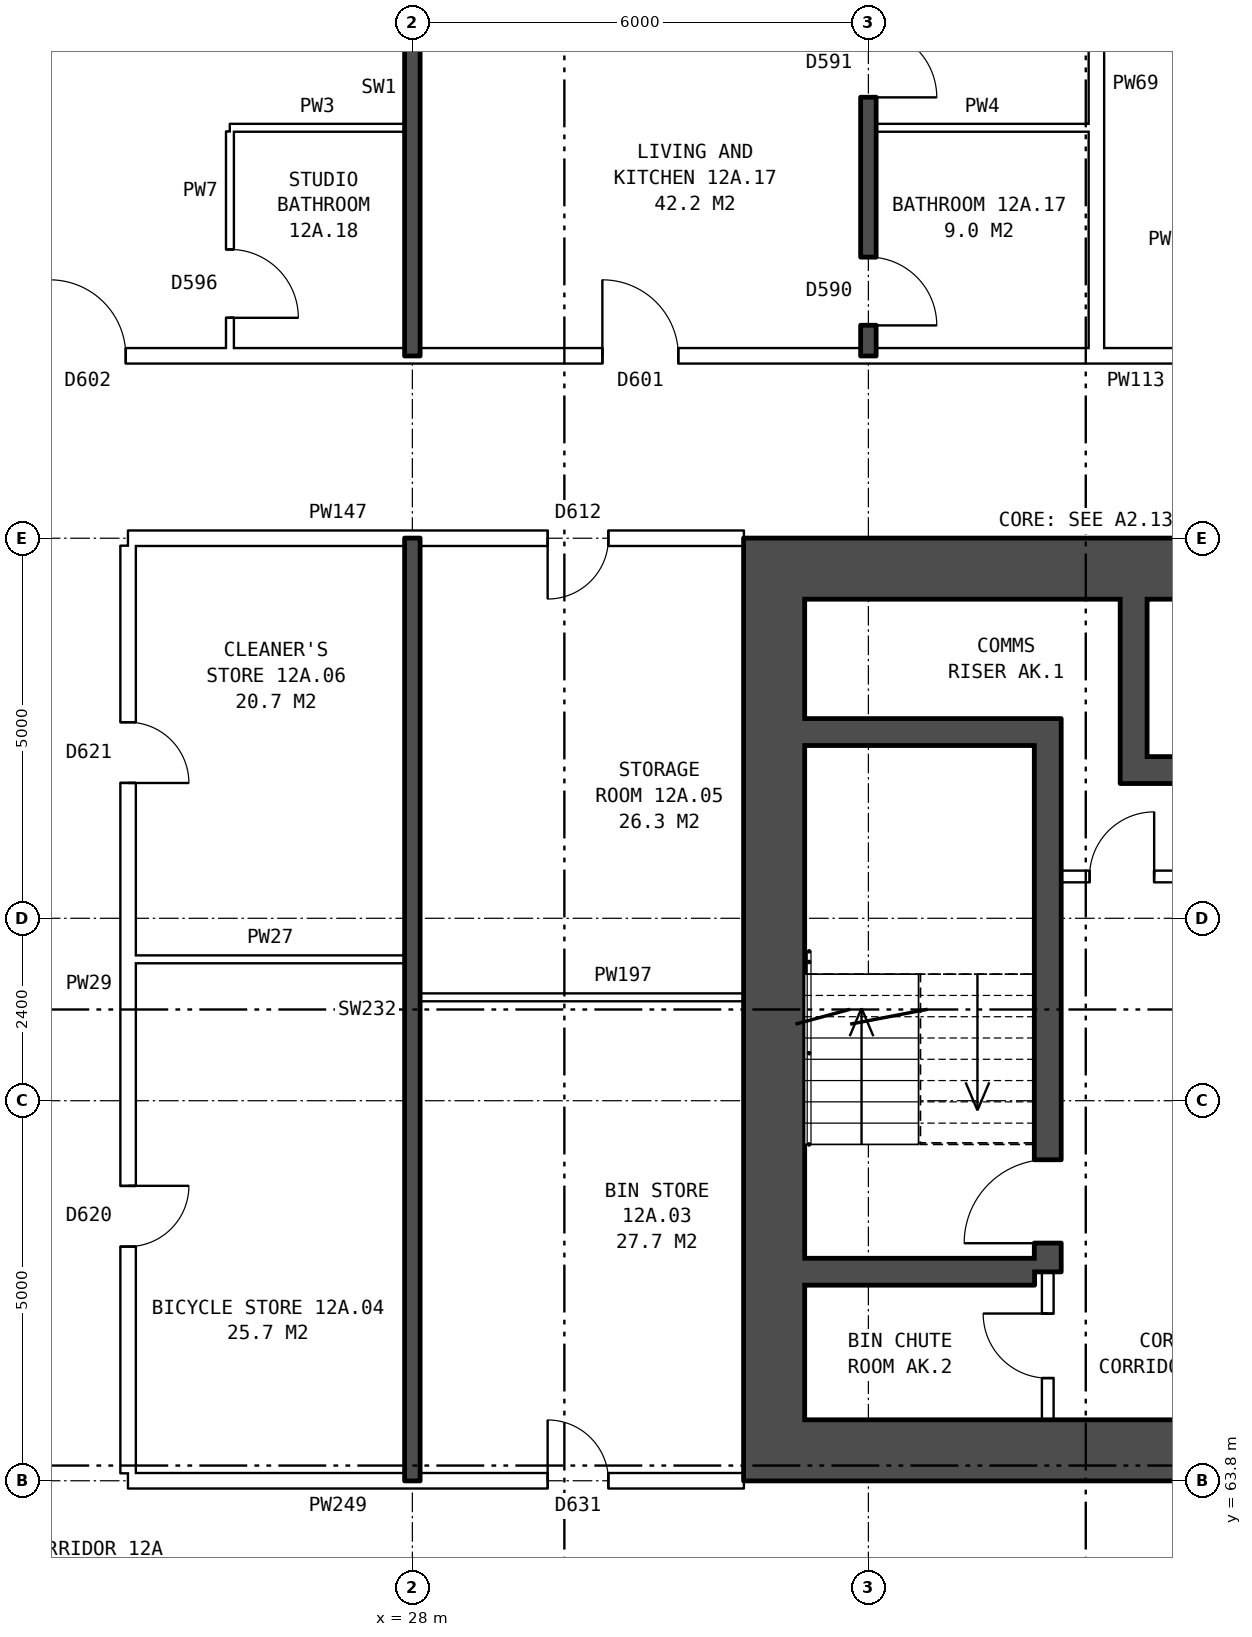
"""IFC4 building model, lengths in metres.
Left out: names, types, materials, properties, quantities, classifications, styles, units other than length and angle.
Written with IfcOpenShell. Run it as: python <this file> out.ifc"""

import sys

from ifc_helpers import new_model, si_unit, direction, frame, frame_2d, origin, place, context, subcontext, project, spatial, rectangle, extrude, element, fill, save


model = new_model("IFC4")
c1 = context("Model", 3, precision=1e-05, world=origin(), true_north=direction((0.0, 1.0)))
c2 = subcontext(c1, "Body", "Model", "MODEL_VIEW")
j1 = project(units=[si_unit("LENGTHUNIT", "METRE"), si_unit("PLANEANGLEUNIT", "RADIAN")], contexts=[c1])
p1 = place(None, origin())
s1 = spatial("IfcSite", under=j1, at=p1, CompositionType="ELEMENT")
p2 = place(p1, origin())
s2 = spatial("IfcBuilding", under=s1, at=p2, CompositionType="ELEMENT")
p3 = place(p2, frame((0.0, 0.0, 47.4)))
s3 = spatial("IfcBuildingStorey", under=s2, at=p3, CompositionType="ELEMENT", Elevation=47.4)
p4 = place(p3, frame((32.76, 75.4, 0.0), z_axis=(0.0, 0.0, 1.0), x_axis=(0.0, -1.0, 0.0)))
e1 = element("IfcWall", 1, at=p4, inside=s3, PredefinedType="SHEAR", context=c2, shape_type="SweptSolid", body=[
    extrude(rectangle(XDim=10.8, YDim=0.8, at=frame_2d((5.4, 0.0))), origin(), (0.0, 0.0, 1.0), 2.85),
])
for number, where, z_axis, x_axis in (
    (2, (41.36, 75.8, 0.0), (0.0, 0.0, 1.0), (-1.0, 0.0, 0.0)),
    (3, (41.36, 64.2, 0.0), (0.0, 0.0, 1.0), (-1.0, 0.0, 0.0)),
):
    element("IfcWall", number, at=place(p3, frame(where, z_axis=z_axis, x_axis=x_axis)), inside=s3, PredefinedType="SHEAR", context=c2, shape_type="SweptSolid", body=[
        extrude(rectangle(XDim=9.0, YDim=0.8, at=frame_2d((4.5, 0.0))), origin(), (0.0, 0.0, 1.0), 2.85),
    ])
p5 = place(p3, frame((36.185, 73.65, 0.0), z_axis=(0.0, 0.0, 1.0), x_axis=(-1.0, 0.0, 0.0)))
e4 = element("IfcWall", 4, at=p5, inside=s3, PredefinedType="SHEAR", context=c2, shape_type="SweptSolid", body=[
    extrude(rectangle(XDim=3.025, YDim=0.35, at=frame_2d((1.513, 0.0))), origin(), (0.0, 0.0, 1.0), 2.85),
])
p6 = place(p3, frame((40.56, 73.15, 0.0), z_axis=(0.0, 0.0, 1.0), x_axis=(-1.0, 0.0, 0.0)))
e5 = element("IfcWall", 5, at=p6, inside=s3, PredefinedType="SHEAR", context=c2, shape_type="SweptSolid", body=[
    extrude(rectangle(XDim=3.245, YDim=0.35, at=frame_2d((1.623, 0.0))), origin(), (0.0, 0.0, 1.0), 2.85),
])
p7 = place(p3, frame((38.135, 71.75, 0.0), z_axis=(0.0, 0.0, 1.0), x_axis=(-1.0, 0.0, 0.0)))
e6 = element("IfcWall", 6, at=p7, inside=s3, PredefinedType="PARTITIONING", context=c2, shape_type="SweptSolid", body=[
    extrude(rectangle(XDim=1.6, YDim=0.15, at=frame_2d((0.8, 0.0))), origin(), (0.0, 0.0, 1.0), 2.85),
])
p8 = place(p7, frame((0.375, 0.0, 0.0)))
e7 = element("IfcOpeningElement", 7, at=p8, cuts=e6, PredefinedType="OPENING", context=c2, shape_type="SweptSolid", body=[
    extrude(rectangle(XDim=0.85, YDim=2.1, at=frame_2d((0.425, 1.05))), frame((0.0, 0.085, 0.0), z_axis=(0.0, -1.0, 0.0), x_axis=(1.0, 0.0, 0.0)), (0.0, 0.0, 1.0), 0.17),
])
p9 = place(p3, frame((36.185, 66.55, 0.0), z_axis=(0.0, 0.0, 1.0), x_axis=(-1.0, 0.0, 0.0)))
e8 = element("IfcWall", 8, at=p9, inside=s3, PredefinedType="SHEAR", context=c2, shape_type="SweptSolid", body=[
    extrude(rectangle(XDim=3.025, YDim=0.35, at=frame_2d((1.513, 0.0))), origin(), (0.0, 0.0, 1.0), 2.85),
])
p10 = place(p3, frame((37.49, 75.4, 0.0), z_axis=(0.0, 0.0, 1.0), x_axis=(0.0, -1.0, 0.0)))
e9 = element("IfcWall", 9, at=p10, inside=s3, PredefinedType="SHEAR", context=c2, shape_type="SweptSolid", body=[
    extrude(rectangle(XDim=2.075, YDim=0.35, at=frame_2d((1.038, 0.0))), origin(), (0.0, 0.0, 1.0), 2.85),
])
p11 = place(p3, frame((36.36, 73.825, 0.0), z_axis=(0.0, 0.0, 1.0), x_axis=(0.0, -1.0, 0.0)))
e10 = element("IfcWall", 10, at=p11, inside=s3, PredefinedType="SHEAR", context=c2, shape_type="SweptSolid", body=[
    extrude(rectangle(XDim=7.275, YDim=0.35, at=frame_2d((3.637, 0.0))), origin(), (0.0, 0.0, 1.0), 2.85),
])
p12 = place(p11, frame((5.8, 0.0, 0.0)))
e11 = element("IfcOpeningElement", 11, at=p12, cuts=e10, PredefinedType="OPENING", context=c2, shape_type="SweptSolid", body=[
    extrude(rectangle(XDim=1.1, YDim=2.1, at=frame_2d((0.55, 1.05))), frame((0.0, 0.185, 0.0), z_axis=(0.0, -1.0, 0.0), x_axis=(1.0, 0.0, 0.0)), (0.0, 0.0, 1.0), 0.37),
])
p13 = place(p3, frame((36.36, 66.55, 0.0), z_axis=(0.0, 0.0, 1.0), x_axis=(0.0, -1.0, 0.0)))
e12 = element("IfcWall", 12, at=p13, inside=s3, PredefinedType="PARTITIONING", context=c2, shape_type="SweptSolid", body=[
    extrude(rectangle(XDim=1.95, YDim=0.15, at=frame_2d((0.975, 0.0))), origin(), (0.0, 0.0, 1.0), 2.85),
])
p14 = place(p13, frame((0.55, 0.0, 0.0)))
e13 = element("IfcOpeningElement", 13, at=p14, cuts=e12, PredefinedType="OPENING", context=c2, shape_type="SweptSolid", body=[
    extrude(rectangle(XDim=0.85, YDim=2.1, at=frame_2d((0.425, 1.05))), frame((0.0, 0.085, 0.0), z_axis=(0.0, -1.0, 0.0), x_axis=(1.0, 0.0, 0.0)), (0.0, 0.0, 1.0), 0.17),
])
p15 = place(p3, frame((24.26, 63.8, 0.0), z_axis=(0.0, 0.0, 1.0), x_axis=(1.0, 0.0, 0.0)))
e14 = element("IfcWall", 14, at=p15, inside=s3, PredefinedType="PARTITIONING", context=c2, shape_type="SweptSolid", body=[
    extrude(rectangle(XDim=8.1, YDim=0.2, at=frame_2d((4.05, 0.0))), origin(), (0.0, 0.0, 1.0), 2.85),
])
p16 = place(p15, frame((5.52, 0.0, 0.0)))
e15 = element("IfcOpeningElement", 15, at=p16, cuts=e14, PredefinedType="OPENING", context=c2, shape_type="SweptSolid", body=[
    extrude(rectangle(XDim=0.8, YDim=2.1, at=frame_2d((0.4, 1.05))), frame((0.0, 0.11, 0.0), z_axis=(0.0, -1.0, 0.0), x_axis=(1.0, 0.0, 0.0)), (0.0, 0.0, 1.0), 0.22),
])
p17 = place(p3, frame((28.1, 70.16, 0.0), z_axis=(0.0, 0.0, 1.0), x_axis=(1.0, 0.0, 0.0)))
e16 = element("IfcWall", 16, at=p17, inside=s3, PredefinedType="PARTITIONING", context=c2, shape_type="SweptSolid", body=[
    extrude(rectangle(XDim=4.26, YDim=0.1, at=frame_2d((2.13, 0.0))), origin(), (0.0, 0.0, 1.0), 2.85),
])
p18 = place(p3, frame((24.36, 70.66, 0.0), z_axis=(0.0, 0.0, 1.0), x_axis=(1.0, 0.0, 0.0)))
e17 = element("IfcWall", 17, at=p18, inside=s3, PredefinedType="PARTITIONING", context=c2, shape_type="SweptSolid", body=[
    extrude(rectangle(XDim=3.54, YDim=0.1, at=frame_2d((1.77, 0.0))), origin(), (0.0, 0.0, 1.0), 2.85),
])
p19 = place(p3, frame((24.26, 76.2, 0.0), z_axis=(0.0, 0.0, 1.0), x_axis=(1.0, 0.0, 0.0)))
e18 = element("IfcWall", 18, at=p19, inside=s3, PredefinedType="PARTITIONING", context=c2, shape_type="SweptSolid", body=[
    extrude(rectangle(XDim=8.1, YDim=0.2, at=frame_2d((4.05, 0.0))), origin(), (0.0, 0.0, 1.0), 2.85),
])
p20 = place(p19, frame((5.52, 0.0, 0.0)))
e19 = element("IfcOpeningElement", 19, at=p20, cuts=e18, PredefinedType="OPENING", context=c2, shape_type="SweptSolid", body=[
    extrude(rectangle(XDim=0.8, YDim=2.1, at=frame_2d((0.4, 1.05))), frame((0.0, 0.11, 0.0), z_axis=(0.0, -1.0, 0.0), x_axis=(1.0, 0.0, 0.0)), (0.0, 0.0, 1.0), 0.22),
])
p21 = place(p3, frame((21.86, 78.6, 0.0), z_axis=(0.0, 0.0, 1.0), x_axis=(1.0, 0.0, 0.0)))
e20 = element("IfcWall", 20, at=p21, inside=s3, PredefinedType="PARTITIONING", context=c2, shape_type="SweptSolid", body=[
    extrude(rectangle(XDim=24.04, YDim=0.2, at=frame_2d((12.02, 0.0))), origin(), (0.0, 0.0, 1.0), 2.85),
])
p22 = place(p21, frame((20.59, 0.0, 0.0)))
e21 = element("IfcOpeningElement", 21, at=p22, cuts=e20, PredefinedType="OPENING", context=c2, shape_type="SweptSolid", body=[
    extrude(rectangle(XDim=1.0, YDim=2.1, at=frame_2d((0.5, 1.05))), frame((0.0, 0.11, 0.0), z_axis=(0.0, -1.0, 0.0), x_axis=(1.0, 0.0, 0.0)), (0.0, 0.0, 1.0), 0.22),
])
p23 = place(p21, frame((8.64, 0.0, 0.0)))
e22 = element("IfcOpeningElement", 22, at=p23, cuts=e20, PredefinedType="OPENING", context=c2, shape_type="SweptSolid", body=[
    extrude(rectangle(XDim=1.0, YDim=2.1, at=frame_2d((0.5, 1.05))), frame((0.0, 0.11, 0.0), z_axis=(0.0, -1.0, 0.0), x_axis=(1.0, 0.0, 0.0)), (0.0, 0.0, 1.0), 0.22),
])
p24 = place(p21, frame((1.37, 0.0, 0.0)))
e23 = element("IfcOpeningElement", 23, at=p24, cuts=e20, PredefinedType="OPENING", context=c2, shape_type="SweptSolid", body=[
    extrude(rectangle(XDim=1.0, YDim=2.1, at=frame_2d((0.5, 1.05))), frame((0.0, 0.11, 0.0), z_axis=(0.0, -1.0, 0.0), x_axis=(1.0, 0.0, 0.0)), (0.0, 0.0, 1.0), 0.22),
])
p25 = place(p3, frame((25.6, 81.6, 0.0), z_axis=(0.0, 0.0, 1.0), x_axis=(1.0, 0.0, 0.0)))
e24 = element("IfcWall", 24, at=p25, inside=s3, PredefinedType="PARTITIONING", context=c2, shape_type="SweptSolid", body=[
    extrude(rectangle(XDim=2.3, YDim=0.1, at=frame_2d((1.15, 0.0))), origin(), (0.0, 0.0, 1.0), 2.85),
])
p26 = place(p3, frame((34.1, 81.6, 0.0), z_axis=(0.0, 0.0, 1.0), x_axis=(1.0, 0.0, 0.0)))
e25 = element("IfcWall", 25, at=p26, inside=s3, PredefinedType="PARTITIONING", context=c2, shape_type="SweptSolid", body=[
    extrude(rectangle(XDim=2.8, YDim=0.1, at=frame_2d((1.4, 0.0))), origin(), (0.0, 0.0, 1.0), 2.85),
])
p27 = place(p3, frame((24.26, 63.9, 0.0), z_axis=(0.0, 0.0, 1.0), x_axis=(0.0, 1.0, 0.0)))
e26 = element("IfcWall", 26, at=p27, inside=s3, PredefinedType="PARTITIONING", context=c2, shape_type="SweptSolid", body=[
    extrude(rectangle(XDim=12.2, YDim=0.2, at=frame_2d((6.1, 0.0))), origin(), (0.0, 0.0, 1.0), 2.85),
])
p28 = place(p27, frame((2.98, 0.0, 0.0)))
e27 = element("IfcOpeningElement", 27, at=p28, cuts=e26, PredefinedType="OPENING", context=c2, shape_type="SweptSolid", body=[
    extrude(rectangle(XDim=0.8, YDim=2.1, at=frame_2d((0.4, 1.05))), frame((0.0, 0.11, 0.0), z_axis=(0.0, -1.0, 0.0), x_axis=(1.0, 0.0, 0.0)), (0.0, 0.0, 1.0), 0.22),
])
p29 = place(p27, frame((9.08, 0.0, 0.0)))
e28 = element("IfcOpeningElement", 28, at=p29, cuts=e26, PredefinedType="OPENING", context=c2, shape_type="SweptSolid", body=[
    extrude(rectangle(XDim=0.8, YDim=2.1, at=frame_2d((0.4, 1.05))), frame((0.0, 0.11, 0.0), z_axis=(0.0, -1.0, 0.0), x_axis=(1.0, 0.0, 0.0)), (0.0, 0.0, 1.0), 0.22),
])
p30 = place(p3, frame((25.6, 78.7, 0.0), z_axis=(0.0, 0.0, 1.0), x_axis=(0.0, 1.0, 0.0)))
e29 = element("IfcWall", 29, at=p30, inside=s3, PredefinedType="PARTITIONING", context=c2, shape_type="SweptSolid", body=[
    extrude(rectangle(XDim=2.85, YDim=0.1, at=frame_2d((1.425, 0.0))), origin(), (0.0, 0.0, 1.0), 2.85),
])
p31 = place(p30, frame((0.4, 0.0, 0.0)))
e30 = element("IfcOpeningElement", 30, at=p31, cuts=e29, PredefinedType="OPENING", context=c2, shape_type="SweptSolid", body=[
    extrude(rectangle(XDim=0.9, YDim=2.1, at=frame_2d((0.45, 1.05))), frame((0.0, 0.06, 0.0), z_axis=(0.0, -1.0, 0.0), x_axis=(1.0, 0.0, 0.0)), (0.0, 0.0, 1.0), 0.12),
])
p32 = place(p3, frame((28.0, 63.8, 0.0), z_axis=(0.0, 0.0, 1.0), x_axis=(0.0, 1.0, 0.0)))
e31 = element("IfcWall", 31, at=p32, inside=s3, PredefinedType="SOLIDWALL", context=c2, shape_type="SweptSolid", body=[
    extrude(rectangle(XDim=12.4, YDim=0.2, at=frame_2d((6.2, 0.0))), origin(), (0.0, 0.0, 1.0), 2.85),
])
p33 = place(p3, frame((28.0, 78.6, 0.0), z_axis=(0.0, 0.0, 1.0), x_axis=(0.0, 1.0, 0.0)))
e32 = element("IfcWall", 32, at=p33, inside=s3, PredefinedType="SOLIDWALL", context=c2, shape_type="SweptSolid", body=[
    extrude(rectangle(XDim=7.04, YDim=0.2, at=frame_2d((3.52, 0.0))), origin(), (0.0, 0.0, 1.0), 2.85),
])
p34 = place(p3, frame((34.0, 78.6, 0.0), z_axis=(0.0, 0.0, 1.0), x_axis=(0.0, 1.0, 0.0)))
e33 = element("IfcWall", 33, at=p34, inside=s3, PredefinedType="SOLIDWALL", context=c2, shape_type="SweptSolid", body=[
    extrude(rectangle(XDim=7.04, YDim=0.2, at=frame_2d((3.52, 0.0))), origin(), (0.0, 0.0, 1.0), 2.85),
])
p35 = place(p34, frame((3.4, 0.0, 0.0)))
e34 = element("IfcOpeningElement", 34, at=p35, cuts=e33, PredefinedType="OPENING", context=c2, shape_type="SweptSolid", body=[
    extrude(rectangle(XDim=0.9, YDim=2.1, at=frame_2d((0.45, 1.05))), frame((0.0, 0.11, 0.0), z_axis=(0.0, -1.0, 0.0), x_axis=(1.0, 0.0, 0.0)), (0.0, 0.0, 1.0), 0.22),
])
p36 = place(p34, frame((0.4, 0.0, 0.0)))
e35 = element("IfcOpeningElement", 35, at=p36, cuts=e33, PredefinedType="OPENING", context=c2, shape_type="SweptSolid", body=[
    extrude(rectangle(XDim=0.9, YDim=2.1, at=frame_2d((0.45, 1.05))), frame((0.0, 0.11, 0.0), z_axis=(0.0, -1.0, 0.0), x_axis=(1.0, 0.0, 0.0)), (0.0, 0.0, 1.0), 0.22),
])
p37 = place(p3, frame((37.0, 78.7, 0.0), z_axis=(0.0, 0.0, 1.0), x_axis=(0.0, 1.0, 0.0)))
e36 = element("IfcWall", 36, at=p37, inside=s3, PredefinedType="PARTITIONING", context=c2, shape_type="SweptSolid", body=[
    extrude(rectangle(XDim=6.94, YDim=0.2, at=frame_2d((3.47, 0.0))), origin(), (0.0, 0.0, 1.0), 2.85),
])
p38 = place(p12, frame((1.1, 0.0, 0.0), z_axis=(0.0, 0.0, 1.0), x_axis=(-1.0, 0.0, 0.0)))
e37 = element("IfcDoor", 37, at=p38, inside=s3, OperationType="SINGLE_SWING_LEFT", PredefinedType="DOOR", context=c2, shape_type="SweptSolid", body=[
    extrude(rectangle(XDim=1.1, YDim=2.1, at=frame_2d((0.55, 1.05))), frame((0.0, 0.025, 0.0), z_axis=(0.0, -1.0, 0.0), x_axis=(1.0, 0.0, 0.0)), (0.0, 0.0, 1.0), 0.05),
])
fill(e11, e37)
p39 = place(p8, frame((0.85, 0.0, 0.0), z_axis=(0.0, 0.0, 1.0), x_axis=(-1.0, 0.0, 0.0)))
e38 = element("IfcDoor", 38, at=p39, inside=s3, OperationType="SINGLE_SWING_RIGHT", PredefinedType="DOOR", context=c2, shape_type="SweptSolid", body=[
    extrude(rectangle(XDim=0.85, YDim=2.1, at=frame_2d((0.425, 1.05))), frame((0.0, 0.025, 0.0), z_axis=(0.0, -1.0, 0.0), x_axis=(1.0, 0.0, 0.0)), (0.0, 0.0, 1.0), 0.05),
])
fill(e7, e38)
p40 = place(p14, frame((0.85, 0.0, 0.0), z_axis=(0.0, 0.0, 1.0), x_axis=(-1.0, 0.0, 0.0)))
e39 = element("IfcDoor", 39, at=p40, inside=s3, OperationType="SINGLE_SWING_RIGHT", PredefinedType="DOOR", context=c2, shape_type="SweptSolid", body=[
    extrude(rectangle(XDim=0.85, YDim=2.1, at=frame_2d((0.425, 1.05))), frame((0.0, 0.025, 0.0), z_axis=(0.0, -1.0, 0.0), x_axis=(1.0, 0.0, 0.0)), (0.0, 0.0, 1.0), 0.05),
])
fill(e13, e39)
p41 = place(p16, origin())
e40 = element("IfcDoor", 40, at=p41, inside=s3, OperationType="SINGLE_SWING_LEFT", PredefinedType="DOOR", context=c2, shape_type="SweptSolid", body=[
    extrude(rectangle(XDim=0.8, YDim=2.1, at=frame_2d((0.4, 1.05))), frame((0.0, 0.025, 0.0), z_axis=(0.0, -1.0, 0.0), x_axis=(1.0, 0.0, 0.0)), (0.0, 0.0, 1.0), 0.05),
])
fill(e15, e40)
p42 = place(p28, frame((0.8, 0.0, 0.0), z_axis=(0.0, 0.0, 1.0), x_axis=(-1.0, 0.0, 0.0)))
e41 = element("IfcDoor", 41, at=p42, inside=s3, OperationType="SINGLE_SWING_LEFT", PredefinedType="DOOR", context=c2, shape_type="SweptSolid", body=[
    extrude(rectangle(XDim=0.8, YDim=2.1, at=frame_2d((0.4, 1.05))), frame((0.0, 0.025, 0.0), z_axis=(0.0, -1.0, 0.0), x_axis=(1.0, 0.0, 0.0)), (0.0, 0.0, 1.0), 0.05),
])
fill(e27, e41)
p43 = place(p20, frame((0.8, 0.0, 0.0), z_axis=(0.0, 0.0, 1.0), x_axis=(-1.0, 0.0, 0.0)))
e42 = element("IfcDoor", 42, at=p43, inside=s3, OperationType="SINGLE_SWING_RIGHT", PredefinedType="DOOR", context=c2, shape_type="SweptSolid", body=[
    extrude(rectangle(XDim=0.8, YDim=2.1, at=frame_2d((0.4, 1.05))), frame((0.0, 0.025, 0.0), z_axis=(0.0, -1.0, 0.0), x_axis=(1.0, 0.0, 0.0)), (0.0, 0.0, 1.0), 0.05),
])
fill(e19, e42)
p44 = place(p29, frame((0.8, 0.0, 0.0), z_axis=(0.0, 0.0, 1.0), x_axis=(-1.0, 0.0, 0.0)))
e43 = element("IfcDoor", 43, at=p44, inside=s3, OperationType="SINGLE_SWING_RIGHT", PredefinedType="DOOR", context=c2, shape_type="SweptSolid", body=[
    extrude(rectangle(XDim=0.8, YDim=2.1, at=frame_2d((0.4, 1.05))), frame((0.0, 0.025, 0.0), z_axis=(0.0, -1.0, 0.0), x_axis=(1.0, 0.0, 0.0)), (0.0, 0.0, 1.0), 0.05),
])
fill(e28, e43)
p45 = place(p35, frame((0.9, 0.0, 0.0), z_axis=(0.0, 0.0, 1.0), x_axis=(-1.0, 0.0, 0.0)))
e44 = element("IfcDoor", 44, at=p45, inside=s3, OperationType="SINGLE_SWING_RIGHT", PredefinedType="DOOR", context=c2, shape_type="SweptSolid", body=[
    extrude(rectangle(XDim=0.9, YDim=2.1, at=frame_2d((0.45, 1.05))), frame((0.0, 0.025, 0.0), z_axis=(0.0, -1.0, 0.0), x_axis=(1.0, 0.0, 0.0)), (0.0, 0.0, 1.0), 0.05),
])
fill(e34, e44)
p46 = place(p23, origin())
e45 = element("IfcDoor", 45, at=p46, inside=s3, OperationType="SINGLE_SWING_LEFT", PredefinedType="DOOR", context=c2, shape_type="SweptSolid", body=[
    extrude(rectangle(XDim=1.0, YDim=2.1, at=frame_2d((0.5, 1.05))), frame((0.0, 0.025, 0.0), z_axis=(0.0, -1.0, 0.0), x_axis=(1.0, 0.0, 0.0)), (0.0, 0.0, 1.0), 0.05),
])
fill(e22, e45)
p47 = place(p36, frame((0.9, 0.0, 0.0), z_axis=(0.0, 0.0, 1.0), x_axis=(-1.0, 0.0, 0.0)))
e46 = element("IfcDoor", 46, at=p47, inside=s3, OperationType="SINGLE_SWING_RIGHT", PredefinedType="DOOR", context=c2, shape_type="SweptSolid", body=[
    extrude(rectangle(XDim=0.9, YDim=2.1, at=frame_2d((0.45, 1.05))), frame((0.0, 0.025, 0.0), z_axis=(0.0, -1.0, 0.0), x_axis=(1.0, 0.0, 0.0)), (0.0, 0.0, 1.0), 0.05),
])
fill(e35, e46)
p48 = place(p24, origin())
e47 = element("IfcDoor", 47, at=p48, inside=s3, OperationType="SINGLE_SWING_LEFT", PredefinedType="DOOR", context=c2, shape_type="SweptSolid", body=[
    extrude(rectangle(XDim=1.0, YDim=2.1, at=frame_2d((0.5, 1.05))), frame((0.0, 0.025, 0.0), z_axis=(0.0, -1.0, 0.0), x_axis=(1.0, 0.0, 0.0)), (0.0, 0.0, 1.0), 0.05),
])
fill(e23, e47)
p49 = place(p31, frame((0.9, 0.0, 0.0), z_axis=(0.0, 0.0, 1.0), x_axis=(-1.0, 0.0, 0.0)))
e48 = element("IfcDoor", 48, at=p49, inside=s3, OperationType="SINGLE_SWING_RIGHT", PredefinedType="DOOR", context=c2, shape_type="SweptSolid", body=[
    extrude(rectangle(XDim=0.9, YDim=2.1, at=frame_2d((0.45, 1.05))), frame((0.0, 0.025, 0.0), z_axis=(0.0, -1.0, 0.0), x_axis=(1.0, 0.0, 0.0)), (0.0, 0.0, 1.0), 0.05),
])
fill(e30, e48)
save(model, sys.argv[1])
